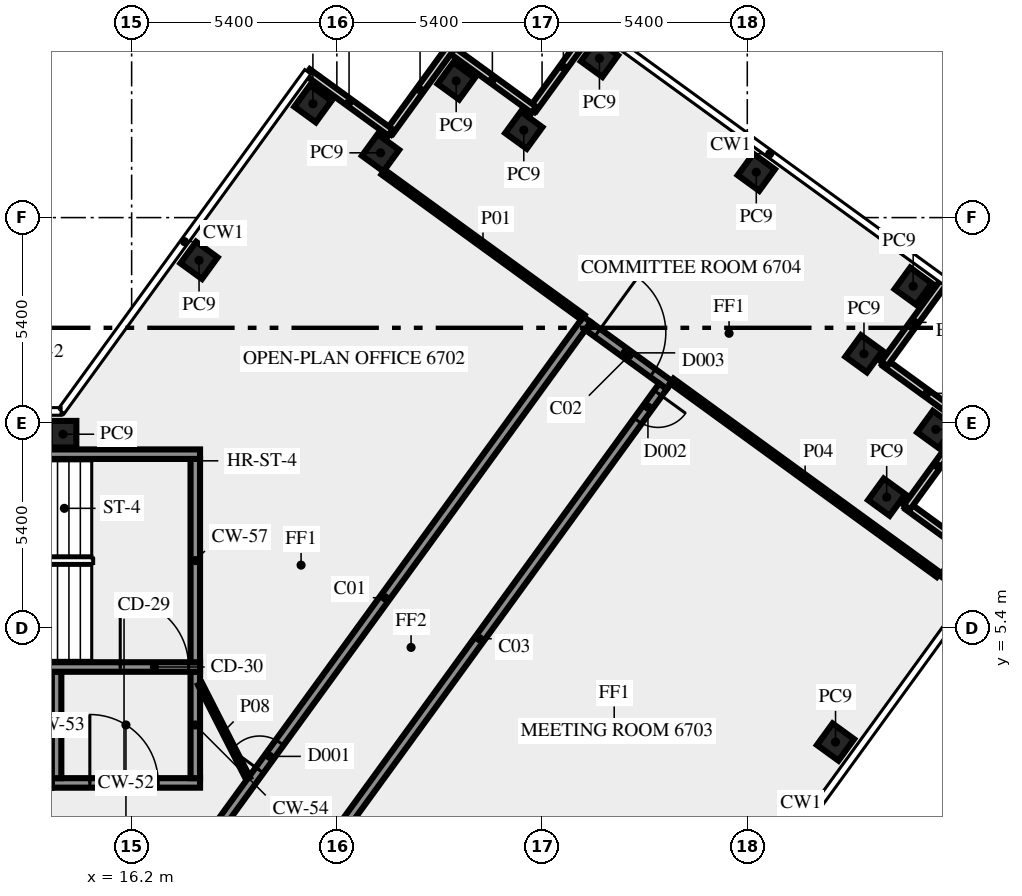
"""IFC4 building model, lengths in metres.
Left out: names, types, materials, properties, quantities, classifications, styles, units other than length and angle.
Written with IfcOpenShell. Run it as: python <this file> out.ifc"""

import sys

from ifc_helpers import new_model, si_unit, direction, frame, frame_2d, origin, origin_2d, place, context, subcontext, project, spatial, rectangle, extrude, element, fill, save


model = new_model("IFC4")
c1 = context("Model", 3, precision=1e-05, world=origin(), true_north=direction((0.0, 1.0)))
c2 = subcontext(c1, "Body", "Model", "MODEL_VIEW")
j1 = project(units=[si_unit("LENGTHUNIT", "METRE"), si_unit("PLANEANGLEUNIT", "RADIAN")], contexts=[c1])
p1 = place(None, origin())
s1 = spatial("IfcSite", under=j1, at=p1, CompositionType="ELEMENT")
p2 = place(p1, origin())
s2 = spatial("IfcBuilding", under=s1, at=p2, CompositionType="ELEMENT")
p3 = place(p2, frame((0.0, 0.0, 289.0)))
s3 = spatial("IfcBuildingStorey", under=s2, at=p3, CompositionType="ELEMENT", Elevation=289.0)
for number, where, z_axis, x_axis in (
    (1, (34.722, 2.4, 0.0), (0.0, 0.0, 1.0), (0.588, 0.809, 0.0)),
    (2, (37.96, 6.855, 0.0), (0.0, 0.0, 1.0), (0.588, 0.809, 0.0)),
    (3, (36.068, 8.844, 0.0), (0.0, 0.0, 1.0), (0.588, 0.809, 0.0)),
    (4, (37.36, 10.625, 0.0), (0.0, 0.0, 1.0), (0.588, 0.809, 0.0)),
    (5, (35.471, 12.616, 0.0), (0.0, 0.0, 1.0), (-0.809, 0.588, 0.0)),
    (6, (36.765, 14.395, 0.0), (0.0, 0.0, 1.0), (-0.809, 0.588, 0.0)),
    (7, (32.637, 17.393, 0.0), (0.0, 0.0, 1.0), (-0.809, 0.588, 0.0)),
    (8, (28.51, 20.39, 0.0), (0.0, 0.0, 1.0), (-0.588, -0.809, 0.0)),
    (9, (26.519, 18.5, 0.0), (0.0, 0.0, 1.0), (-0.809, 0.588, 0.0)),
    (10, (24.74, 19.795, 0.0), (0.0, 0.0, 1.0), (-0.588, -0.809, 0.0)),
    (11, (22.749, 17.904, 0.0), (0.0, 0.0, 1.0), (-0.588, -0.809, 0.0)),
    (12, (20.97, 19.195, 0.0), (0.0, 0.0, 1.0), (-0.588, -0.809, 0.0)),
    (13, (17.974, 15.075, 0.0), (0.0, 0.0, 1.0), (-0.588, -0.809, 0.0)),
    (14, (14.395, 10.5, 0.0), (0.0, 0.0, 1.0), (-1.0, 0.0, 0.0)),
):
    element("IfcColumn", number, at=place(p3, frame(where, z_axis=z_axis, x_axis=x_axis)), inside=s3, PredefinedType="COLUMN", context=c2, shape_type="SweptSolid", body=[
        extrude(rectangle(XDim=0.7, YDim=0.7, at=origin_2d()), origin(), (0.0, 0.0, 1.0), 3.65),
    ])
for number, where, z_axis, x_axis in (
    (15, (38.814, 7.01, 0.0), (0.0, 0.0, 1.0), (-0.809, 0.588, 0.0)),
    (16, (36.602, 8.58, 0.0), (0.0, 0.0, 1.0), (0.588, 0.809, 0.0)),
    (17, (38.216, 10.782, 0.0), (0.0, 0.0, 1.0), (-0.809, 0.588, 0.0)),
    (18, (36.005, 12.352, 0.0), (0.0, 0.0, 1.0), (0.588, 0.809, 0.0)),
):
    element("IfcWall", number, at=place(p3, frame(where, z_axis=z_axis, x_axis=x_axis)), inside=s3, PredefinedType="SOLIDWALL", context=c2, shape_type="SweptSolid", body=[
        extrude(rectangle(XDim=2.7, YDim=0.2, at=frame_2d((1.35, 0.0))), origin(), (0.0, 0.0, 1.0), 3.65),
    ])
for number, where, z_axis, x_axis in (
    (19, (28.354, 21.247, 0.0), (0.0, 0.0, 1.0), (-0.588, -0.809, 0.0)),
    (20, (26.785, 19.036, 0.0), (0.0, 0.0, 1.0), (-0.809, 0.588, 0.0)),
):
    element("IfcWall", number, at=place(p3, frame(where, z_axis=z_axis, x_axis=x_axis)), inside=s3, PredefinedType="SOLIDWALL", context=c2, shape_type="SweptSolid", body=[
        extrude(rectangle(XDim=2.7, YDim=0.2, at=frame_2d((1.35, 0.0))), origin(), (0.0, 0.0, 1.0), 3.65),
    ])
for number, where, z_axis, x_axis in (
    (21, (24.583, 20.65, 0.0), (0.0, 0.0, 1.0), (-0.588, -0.809, 0.0)),
    (22, (23.013, 18.438, 0.0), (0.0, 0.0, 1.0), (-0.809, 0.588, 0.0)),
):
    element("IfcWall", number, at=place(p3, frame(where, z_axis=z_axis, x_axis=x_axis)), inside=s3, PredefinedType="SOLIDWALL", context=c2, shape_type="SweptSolid", body=[
        extrude(rectangle(XDim=2.7, YDim=0.2, at=frame_2d((1.35, 0.0))), origin(), (0.0, 0.0, 1.0), 3.65),
    ])
p4 = place(p3, frame((14.1, 1.325, 0.0), z_axis=(0.0, 0.0, 1.0), x_axis=(1.0, 0.0, 0.0)))
e23 = element("IfcWall", 23, at=p4, inside=s3, PredefinedType="SHEAR", context=c2, shape_type="SweptSolid", body=[
    extrude(rectangle(XDim=3.9, YDim=0.25, at=frame_2d((1.95, 0.0))), origin(), (0.0, 0.0, 1.0), 3.65),
])
p5 = place(p4, frame((1.0, 0.0, 0.0)))
e24 = element("IfcOpeningElement", 24, at=p5, cuts=e23, PredefinedType="OPENING", context=c2, shape_type="SweptSolid", body=[
    extrude(rectangle(XDim=1.8, YDim=2.1, at=frame_2d((0.9, 1.05))), frame((0.0, 0.135, 0.0), z_axis=(0.0, -1.0, 0.0), x_axis=(1.0, 0.0, 0.0)), (0.0, 0.0, 1.0), 0.27),
])
for number, where, z_axis, x_axis in (
    (25, (14.225, 1.45, 0.0), (0.0, 0.0, 1.0), (0.0, 1.0, 0.0)),
    (26, (17.875, 1.45, 0.0), (0.0, 0.0, 1.0), (0.0, 1.0, 0.0)),
):
    element("IfcWall", number, at=place(p3, frame(where, z_axis=z_axis, x_axis=x_axis)), inside=s3, PredefinedType="SHEAR", context=c2, shape_type="SweptSolid", body=[
        extrude(rectangle(XDim=2.8, YDim=0.25, at=frame_2d((1.4, 0.0))), origin(), (0.0, 0.0, 1.0), 3.65),
    ])
p6 = place(p3, frame((7.5, 4.375, 0.0), z_axis=(0.0, 0.0, 1.0), x_axis=(1.0, 0.0, 0.0)))
e27 = element("IfcWall", 27, at=p6, inside=s3, PredefinedType="SHEAR", context=c2, shape_type="SweptSolid", body=[
    extrude(rectangle(XDim=10.5, YDim=0.25, at=frame_2d((5.25, 0.0))), origin(), (0.0, 0.0, 1.0), 3.65),
])
p7 = place(p6, frame((8.4, 0.0, 0.0)))
e28 = element("IfcOpeningElement", 28, at=p7, cuts=e27, PredefinedType="OPENING", context=c2, shape_type="SweptSolid", body=[
    extrude(rectangle(XDim=1.8, YDim=2.1, at=frame_2d((0.9, 1.05))), frame((0.0, 0.135, 0.0), z_axis=(0.0, -1.0, 0.0), x_axis=(1.0, 0.0, 0.0)), (0.0, 0.0, 1.0), 0.27),
])
p8 = place(p3, frame((17.875, 4.5, 0.0), z_axis=(0.0, 0.0, 1.0), x_axis=(0.0, 1.0, 0.0)))
e29 = element("IfcWall", 29, at=p8, inside=s3, PredefinedType="SHEAR", context=c2, shape_type="SweptSolid", body=[
    extrude(rectangle(XDim=5.35, YDim=0.25, at=frame_2d((2.675, 0.0))), origin(), (0.0, 0.0, 1.0), 3.65),
])
p9 = place(p3, frame((7.5, 9.975, 0.0), z_axis=(0.0, 0.0, 1.0), x_axis=(1.0, 0.0, 0.0)))
e30 = element("IfcWall", 30, at=p9, inside=s3, PredefinedType="SHEAR", context=c2, shape_type="SweptSolid", body=[
    extrude(rectangle(XDim=10.5, YDim=0.25, at=frame_2d((5.25, 0.0))), origin(), (0.0, 0.0, 1.0), 3.65),
])
p10 = place(p9, frame((2.0, 0.0, 1.0)))
e31 = element("IfcOpeningElement", 31, at=p10, cuts=e30, PredefinedType="OPENING", context=c2, shape_type="SweptSolid", body=[
    extrude(rectangle(XDim=1.2, YDim=1.2, at=frame_2d((0.6, 0.6))), frame((0.0, 0.135, 0.0), z_axis=(0.0, -1.0, 0.0), x_axis=(1.0, 0.0, 0.0)), (0.0, 0.0, 1.0), 0.27),
])
p11 = place(p3, frame((17.545, -1.125, 0.0), z_axis=(0.0, 0.0, 1.0), x_axis=(0.58779555165, 0.809009511354, 0.0)))
e32 = element("IfcWall", 32, at=p11, inside=s3, PredefinedType="SOLIDWALL", context=c2, shape_type="SweptSolid", body=[
    extrude(rectangle(XDim=18.103, YDim=0.25, at=frame_2d((9.052, 0.0))), origin(), (0.0, 0.0, 1.0), 3.65),
])
p12 = place(p11, frame((3.441, 0.0, 0.0)))
e33 = element("IfcOpeningElement", 33, at=p12, cuts=e32, PredefinedType="OPENING", context=c2, shape_type="SweptSolid", body=[
    extrude(rectangle(XDim=0.9, YDim=2.1, at=frame_2d((0.45, 1.05))), frame((0.0, 0.135, 0.0), z_axis=(0.0, -1.0, 0.0), x_axis=(1.0, 0.0, 0.0)), (0.0, 0.0, 1.0), 0.27),
])
p13 = place(p3, frame((28.213, 13.346, 0.0), z_axis=(0.0, 0.0, 1.0), x_axis=(0.809006914995, -0.587799125119, 0.0)))
e34 = element("IfcWall", 34, at=p13, inside=s3, PredefinedType="SOLIDWALL", context=c2, shape_type="SweptSolid", body=[
    extrude(rectangle(XDim=2.65, YDim=0.25, at=frame_2d((1.325, 0.0))), origin(), (0.0, 0.0, 1.0), 3.65),
])
p14 = place(p13, frame((0.3, 0.0, 0.0)))
e35 = element("IfcOpeningElement", 35, at=p14, cuts=e34, PredefinedType="OPENING", context=c2, shape_type="SweptSolid", body=[
    extrude(rectangle(XDim=1.8, YDim=2.1, at=frame_2d((0.9, 1.05))), frame((0.0, 0.135, 0.0), z_axis=(0.0, -1.0, 0.0), x_axis=(1.0, 0.0, 0.0)), (0.0, 0.0, 1.0), 0.27),
])
p15 = place(p3, frame((30.183, 11.761, 0.0), z_axis=(0.0, 0.0, 1.0), x_axis=(-0.587781762867, -0.80901952958, 0.0)))
e36 = element("IfcWall", 36, at=p15, inside=s3, PredefinedType="SOLIDWALL", context=c2, shape_type="SweptSolid", body=[
    extrude(rectangle(XDim=16.42, YDim=0.25, at=frame_2d((8.21, 0.0))), origin(), (0.0, 0.0, 1.0), 3.65),
])
p16 = place(p15, frame((0.225, 0.0, 0.0)))
e37 = element("IfcOpeningElement", 37, at=p16, cuts=e36, PredefinedType="OPENING", context=c2, shape_type="SweptSolid", body=[
    extrude(rectangle(XDim=0.9, YDim=2.1, at=frame_2d((0.45, 1.05))), frame((0.0, 0.135, 0.0), z_axis=(0.0, -1.0, 0.0), x_axis=(1.0, 0.0, 0.0)), (0.0, 0.0, 1.0), 0.27),
])
p17 = place(p3, frame((28.073, 13.578, 0.0), z_axis=(0.0, 0.0, 1.0), x_axis=(-0.809000932727, 0.587807358619, 0.0)))
e38 = element("IfcWall", 38, at=p17, inside=s3, PredefinedType="PARTITIONING", context=c2, shape_type="SweptSolid", body=[
    extrude(rectangle(XDim=6.496, YDim=0.15, at=frame_2d((3.248, 0.0))), origin(), (0.0, 0.0, 1.0), 3.65),
])
p18 = place(p3, frame((30.415, 11.902, 0.0), z_axis=(0.0, 0.0, 1.0), x_axis=(0.809020922653, -0.587779845444, 0.0)))
e39 = element("IfcWall", 39, at=p18, inside=s3, PredefinedType="PARTITIONING", context=c2, shape_type="SweptSolid", body=[
    extrude(rectangle(XDim=8.67, YDim=0.15, at=frame_2d((4.335, 0.0))), origin(), (0.0, 0.0, 1.0), 3.65),
])
p19 = place(p3, frame((18.0, 3.925, 0.0), z_axis=(0.0, 0.0, 1.0), x_axis=(0.453950796792, -0.891026752736, 0.0)))
e40 = element("IfcWall", 40, at=p19, inside=s3, PredefinedType="PARTITIONING", context=c2, shape_type="SweptSolid", body=[
    extrude(rectangle(XDim=2.778, YDim=0.12, at=frame_2d((1.389, 0.0))), origin(), (0.0, 0.0, 1.0), 3.65),
])
p20 = place(p5, origin())
e41 = element("IfcDoor", 41, at=p20, inside=s3, OperationType="DOUBLE_DOOR_SINGLE_SWING", PredefinedType="DOOR", context=c2, shape_type="SweptSolid", body=[
    extrude(rectangle(XDim=1.8, YDim=2.1, at=frame_2d((0.9, 1.05))), frame((0.0, 0.025, 0.0), z_axis=(0.0, -1.0, 0.0), x_axis=(1.0, 0.0, 0.0)), (0.0, 0.0, 1.0), 0.05),
])
fill(e24, e41)
p21 = place(p7, origin())
e42 = element("IfcDoor", 42, at=p21, inside=s3, OperationType="DOUBLE_DOOR_SINGLE_SWING", PredefinedType="DOOR", context=c2, shape_type="SweptSolid", body=[
    extrude(rectangle(XDim=1.8, YDim=2.1, at=frame_2d((0.9, 1.05))), frame((0.0, 0.025, 0.0), z_axis=(0.0, -1.0, 0.0), x_axis=(1.0, 0.0, 0.0)), (0.0, 0.0, 1.0), 0.05),
])
fill(e28, e42)
p22 = place(p12, origin())
e43 = element("IfcDoor", 43, at=p22, inside=s3, OperationType="SINGLE_SWING_LEFT", PredefinedType="DOOR", context=c2, shape_type="SweptSolid", body=[
    extrude(rectangle(XDim=0.9, YDim=2.1, at=frame_2d((0.45, 1.05))), frame((0.0, 0.025, 0.0), z_axis=(0.0, -1.0, 0.0), x_axis=(1.0, 0.0, 0.0)), (0.0, 0.0, 1.0), 0.05),
])
fill(e33, e43)
p23 = place(p14, origin())
e44 = element("IfcDoor", 44, at=p23, inside=s3, OperationType="DOUBLE_DOOR_SINGLE_SWING", PredefinedType="DOOR", context=c2, shape_type="SweptSolid", body=[
    extrude(rectangle(XDim=1.8, YDim=2.1, at=frame_2d((0.9, 1.05))), frame((0.0, 0.025, 0.0), z_axis=(0.0, -1.0, 0.0), x_axis=(1.0, 0.0, 0.0)), (0.0, 0.0, 1.0), 0.05),
])
fill(e35, e44)
p24 = place(p16, origin())
e45 = element("IfcDoor", 45, at=p24, inside=s3, OperationType="SINGLE_SWING_LEFT", PredefinedType="DOOR", context=c2, shape_type="SweptSolid", body=[
    extrude(rectangle(XDim=0.9, YDim=2.1, at=frame_2d((0.45, 1.05))), frame((0.0, 0.025, 0.0), z_axis=(0.0, -1.0, 0.0), x_axis=(1.0, 0.0, 0.0)), (0.0, 0.0, 1.0), 0.05),
])
fill(e37, e45)
save(model, sys.argv[1])
